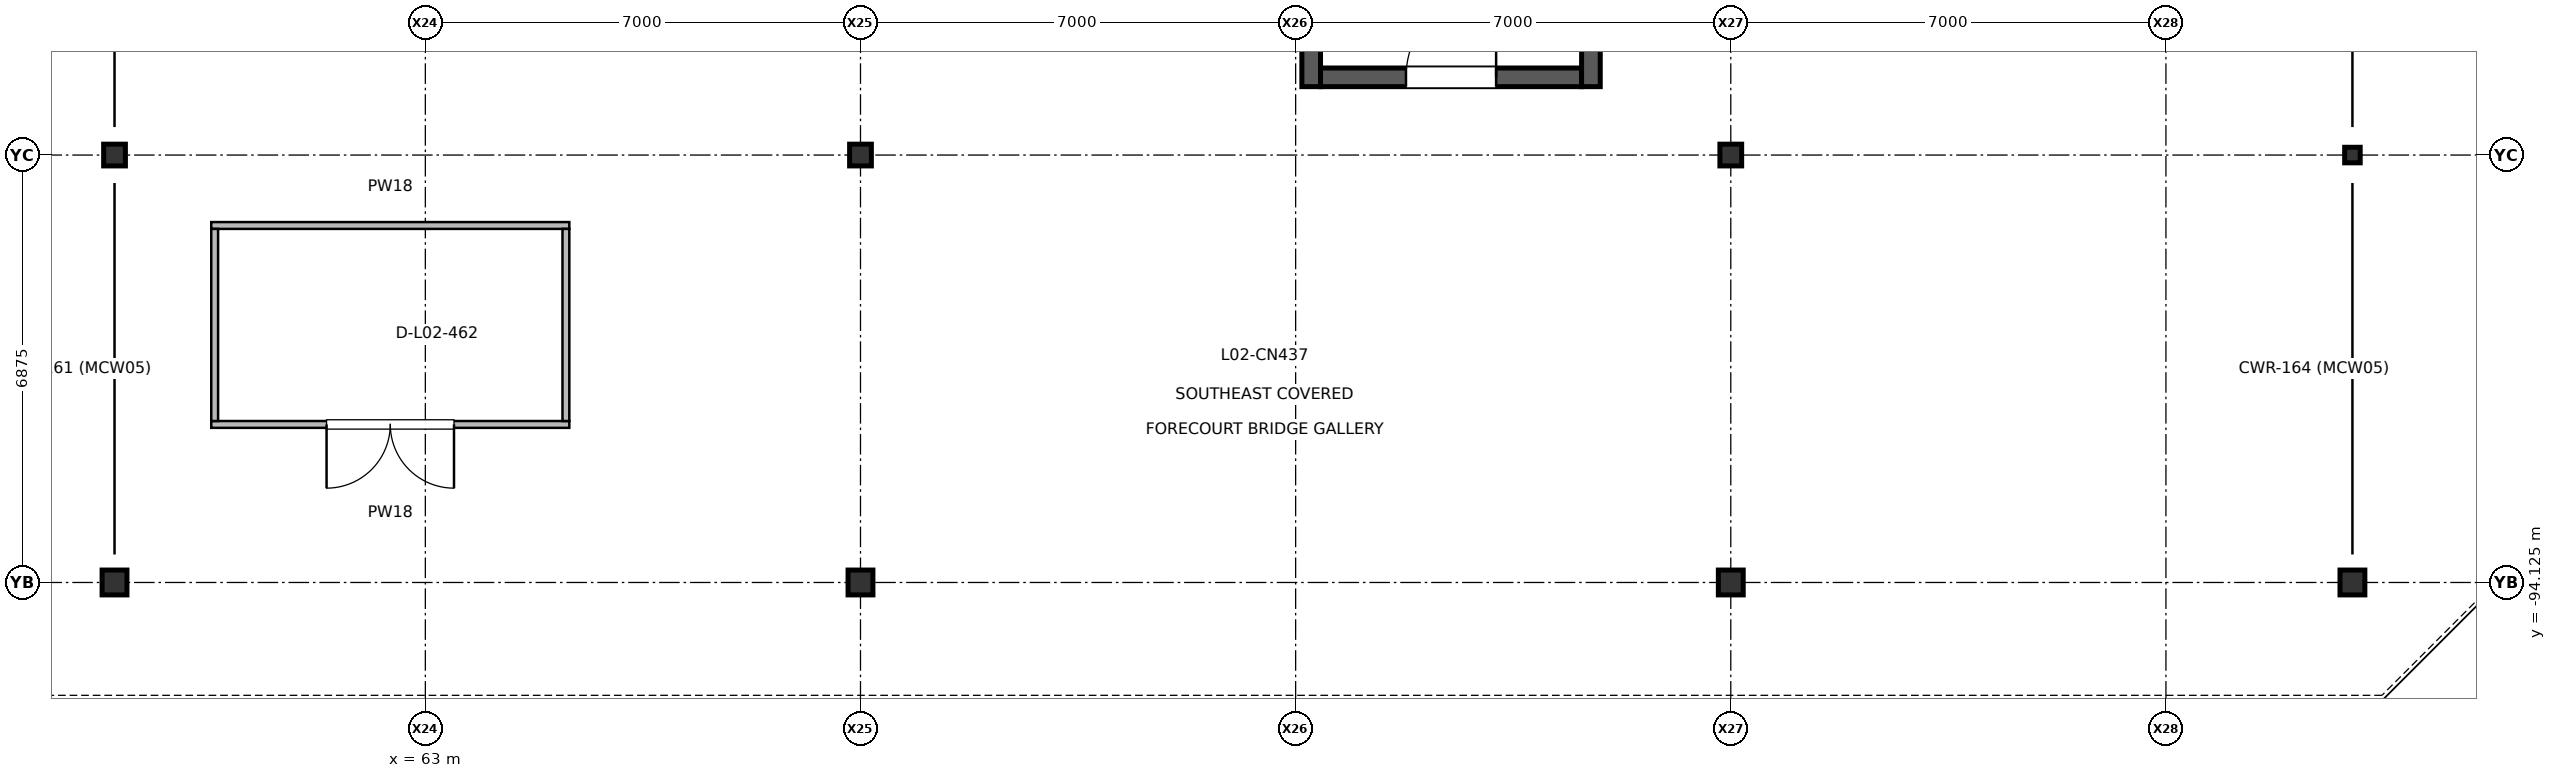
"""IFC4 building model, lengths in metres.
Left out: names, types, materials, properties, quantities, classifications, styles, units other than length and angle.
Written with IfcOpenShell. Run it as: python <this file> out.ifc"""

import sys

from ifc_helpers import new_model, si_unit, direction, frame, frame_2d, origin, origin_2d, place, context, subcontext, project, spatial, rectangle, i_section, extrude, element, fill, save


model = new_model("IFC4")
c1 = context("Model", 3, precision=1e-05, world=origin(), true_north=direction((0.0, 1.0)))
c2 = subcontext(c1, "Body", "Model", "MODEL_VIEW")
j1 = project(units=[si_unit("LENGTHUNIT", "METRE"), si_unit("PLANEANGLEUNIT", "RADIAN")], contexts=[c1])
p1 = place(None, origin())
s1 = spatial("IfcSite", under=j1, at=p1, CompositionType="ELEMENT")
p2 = place(p1, origin())
s2 = spatial("IfcBuilding", under=s1, at=p2, CompositionType="ELEMENT")
p3 = place(p2, frame((0.0, 0.0, 6.0)))
s3 = spatial("IfcBuildingStorey", under=s2, at=p3, CompositionType="ELEMENT", Elevation=6.0)
p4 = place(p3, frame((58.0, -94.125, 0.0), z_axis=(0.0, 0.0, 1.0), x_axis=(1.0, 0.0, 0.0)))
e1 = element("IfcColumn", 1, at=p4, inside=s3, PredefinedType="COLUMN", context=c2, shape_type="SweptSolid", body=[
    extrude(i_section(OverallWidth=0.4, OverallDepth=0.4, WebThickness=0.013, FlangeThickness=0.021, at=origin_2d()), origin(), (0.0, 0.0, 1.0), 5.4),
])
p5 = place(p3, frame((58.0, -87.25, 0.0), z_axis=(0.0, 0.0, 1.0), x_axis=(1.0, 0.0, 0.0)))
e2 = element("IfcColumn", 2, at=p5, inside=s3, PredefinedType="COLUMN", context=c2, shape_type="SweptSolid", body=[
    extrude(i_section(OverallWidth=0.35, OverallDepth=0.35, WebThickness=0.012, FlangeThickness=0.019, at=origin_2d()), origin(), (0.0, 0.0, 1.0), 5.4),
])
p6 = place(p3, frame((70.0, -94.125, 0.0), z_axis=(0.0, 0.0, 1.0), x_axis=(1.0, 0.0, 0.0)))
e3 = element("IfcColumn", 3, at=p6, inside=s3, PredefinedType="COLUMN", context=c2, shape_type="SweptSolid", body=[
    extrude(i_section(OverallWidth=0.4, OverallDepth=0.4, WebThickness=0.013, FlangeThickness=0.021, at=origin_2d()), origin(), (0.0, 0.0, 1.0), 5.4),
])
p7 = place(p3, frame((70.0, -87.25, 0.0), z_axis=(0.0, 0.0, 1.0), x_axis=(1.0, 0.0, 0.0)))
e4 = element("IfcColumn", 4, at=p7, inside=s3, PredefinedType="COLUMN", context=c2, shape_type="SweptSolid", body=[
    extrude(i_section(OverallWidth=0.35, OverallDepth=0.35, WebThickness=0.012, FlangeThickness=0.019, at=origin_2d()), origin(), (0.0, 0.0, 1.0), 5.4),
])
p8 = place(p3, frame((84.0, -94.125, 0.0), z_axis=(0.0, 0.0, 1.0), x_axis=(1.0, 0.0, 0.0)))
e5 = element("IfcColumn", 5, at=p8, inside=s3, PredefinedType="COLUMN", context=c2, shape_type="SweptSolid", body=[
    extrude(i_section(OverallWidth=0.4, OverallDepth=0.4, WebThickness=0.013, FlangeThickness=0.021, at=origin_2d()), origin(), (0.0, 0.0, 1.0), 5.4),
])
p9 = place(p3, frame((84.0, -87.25, 0.0), z_axis=(0.0, 0.0, 1.0), x_axis=(1.0, 0.0, 0.0)))
e6 = element("IfcColumn", 6, at=p9, inside=s3, PredefinedType="COLUMN", context=c2, shape_type="SweptSolid", body=[
    extrude(i_section(OverallWidth=0.35, OverallDepth=0.35, WebThickness=0.012, FlangeThickness=0.019, at=origin_2d()), origin(), (0.0, 0.0, 1.0), 5.4),
])
p10 = place(p3, frame((94.0, -94.125, 0.0), z_axis=(0.0, 0.0, 1.0), x_axis=(1.0, 0.0, 0.0)))
e7 = element("IfcColumn", 7, at=p10, inside=s3, PredefinedType="COLUMN", context=c2, shape_type="SweptSolid", body=[
    extrude(i_section(OverallWidth=0.4, OverallDepth=0.4, WebThickness=0.013, FlangeThickness=0.021, at=origin_2d()), origin(), (0.0, 0.0, 1.0), 5.4),
])
p11 = place(p3, frame((94.0, -87.25, 0.0), z_axis=(0.0, 0.0, 1.0), x_axis=(1.0, 0.0, 0.0)))
e8 = element("IfcColumn", 8, at=p11, inside=s3, PredefinedType="COLUMN", context=c2, shape_type="SweptSolid", body=[
    extrude(i_section(OverallWidth=0.25, OverallDepth=0.25, WebThickness=0.009, FlangeThickness=0.014, at=origin_2d()), origin(), (0.0, 0.0, 1.0), 5.4),
])
p12 = place(p3, frame((65.316, -91.583, 0.0), z_axis=(0.0, 0.0, 1.0), x_axis=(-1.0, 0.0, 0.0)))
e9 = element("IfcWall", 9, at=p12, inside=s3, PredefinedType="PARTITIONING", context=c2, shape_type="SweptSolid", body=[
    extrude(rectangle(XDim=5.76, YDim=0.11, at=frame_2d((2.88, 0.0))), origin(), (0.0, 0.0, 1.0), 4.42),
])
p13 = place(p12, frame((1.855, 0.0, 0.0)))
e10 = element("IfcOpeningElement", 10, at=p13, cuts=e9, PredefinedType="OPENING", context=c2, shape_type="SweptSolid", body=[
    extrude(rectangle(XDim=2.05, YDim=2.4, at=frame_2d((1.025, 1.2))), frame((0.0, 0.065, 0.0), z_axis=(0.0, -1.0, 0.0), x_axis=(1.0, 0.0, 0.0)), (0.0, 0.0, 1.0), 0.13),
])
p14 = place(p3, frame((59.556, -88.383, 0.0), z_axis=(0.0, 0.0, 1.0), x_axis=(1.0, 0.0, 0.0)))
e11 = element("IfcWall", 11, at=p14, inside=s3, PredefinedType="PARTITIONING", context=c2, shape_type="SweptSolid", body=[
    extrude(rectangle(XDim=5.76, YDim=0.11, at=frame_2d((2.88, 0.0))), origin(), (0.0, 0.0, 1.0), 4.42),
])
for number, where, z_axis, x_axis in (
    (12, (59.611, -91.528, 0.0), (0.0, 0.0, 1.0), (0.0, 1.0, 0.0)),
    (13, (65.261, -91.528, 0.0), (0.0, 0.0, 1.0), (0.0, 1.0, 0.0)),
):
    element("IfcWall", number, at=place(p3, frame(where, z_axis=z_axis, x_axis=x_axis)), inside=s3, PredefinedType="PARTITIONING", context=c2, shape_type="SweptSolid", body=[
        extrude(rectangle(XDim=3.09, YDim=0.11, at=frame_2d((1.545, 0.0))), origin(), (0.0, 0.0, 1.0), 4.42),
    ])
p15 = place(p3, frame((77.4, -86.0, 0.0), z_axis=(0.0, 0.0, 1.0), x_axis=(1.0, 0.0, 0.0)))
e14 = element("IfcWall", 14, at=p15, inside=s3, PredefinedType="SHEAR", context=c2, shape_type="SweptSolid", body=[
    extrude(rectangle(XDim=4.2, YDim=0.3, at=frame_2d((2.1, 0.0))), origin(), (0.0, 0.0, 1.0), 5.15),
])
p16 = place(p15, frame((1.375, 0.0, 0.0)))
e15 = element("IfcOpeningElement", 15, at=p16, cuts=e14, PredefinedType="OPENING", context=c2, shape_type="SweptSolid", body=[
    extrude(rectangle(XDim=1.45, YDim=2.2, at=frame_2d((0.725, 1.1))), frame((0.0, 0.16, 0.0), z_axis=(0.0, -1.0, 0.0), x_axis=(1.0, 0.0, 0.0)), (0.0, 0.0, 1.0), 0.32),
])
for number, where, z_axis, x_axis in (
    (16, (77.25, -86.15, 0.0), (0.0, 0.0, 1.0), (0.0, 1.0, 0.0)),
    (17, (81.75, -86.15, 0.0), (0.0, 0.0, 1.0), (0.0, 1.0, 0.0)),
):
    element("IfcWall", number, at=place(p3, frame(where, z_axis=z_axis, x_axis=x_axis)), inside=s3, PredefinedType="SHEAR", context=c2, shape_type="SweptSolid", body=[
        extrude(rectangle(XDim=8.45, YDim=0.3, at=frame_2d((4.225, 0.0))), origin(), (0.0, 0.0, 1.0), 5.15),
    ])
p17 = place(p13, origin())
e18 = element("IfcDoor", 18, at=p17, inside=s3, OperationType="DOUBLE_DOOR_SINGLE_SWING", PredefinedType="DOOR", context=c2, shape_type="SweptSolid", body=[
    extrude(rectangle(XDim=2.05, YDim=2.4, at=frame_2d((1.025, 1.2))), frame((0.0, 0.025, 0.0), z_axis=(0.0, -1.0, 0.0), x_axis=(1.0, 0.0, 0.0)), (0.0, 0.0, 1.0), 0.05),
])
fill(e10, e18)
p18 = place(p16, origin())
e19 = element("IfcDoor", 19, at=p18, inside=s3, OperationType="SINGLE_SWING_RIGHT", PredefinedType="DOOR", context=c2, shape_type="SweptSolid", body=[
    extrude(rectangle(XDim=1.45, YDim=2.2, at=frame_2d((0.725, 1.1))), frame((0.0, 0.025, 0.0), z_axis=(0.0, -1.0, 0.0), x_axis=(1.0, 0.0, 0.0)), (0.0, 0.0, 1.0), 0.05),
])
fill(e15, e19)
save(model, sys.argv[1])
